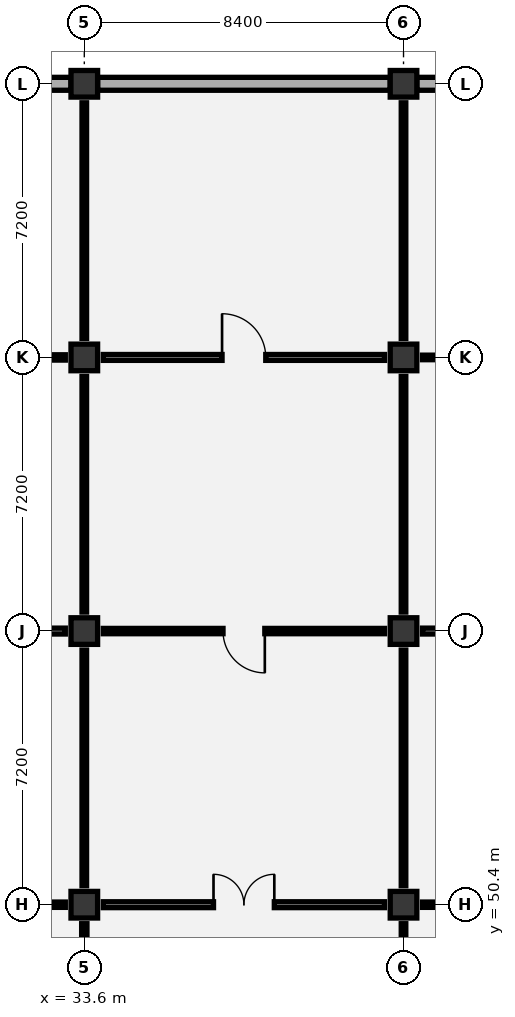
"""IFC4 building model, lengths in metres.
Left out: names, types, materials, properties, quantities, classifications, styles, units other than length and angle.
Written with IfcOpenShell. Run it as: python <this file> out.ifc"""

import sys

from ifc_helpers import new_model, si_unit, direction, frame, frame_2d, origin, origin_2d, place, context, subcontext, project, spatial, rectangle, extrude, element, fill, save


model = new_model("IFC4")
c1 = context("Model", 3, precision=1e-05, world=origin(), true_north=direction((0.0, 1.0)))
c2 = subcontext(c1, "Body", "Model", "MODEL_VIEW")
j1 = project(units=[si_unit("LENGTHUNIT", "METRE"), si_unit("PLANEANGLEUNIT", "RADIAN")], contexts=[c1])
p1 = place(None, origin())
s1 = spatial("IfcSite", under=j1, at=p1, CompositionType="ELEMENT")
p2 = place(p1, origin())
s2 = spatial("IfcBuilding", under=s1, at=p2, CompositionType="ELEMENT")
p3 = place(p2, origin())
s3 = spatial("IfcBuildingStorey", under=s2, at=p3, CompositionType="ELEMENT", Elevation=0.0)
for number, where, z_axis, x_axis in (
    (1, (33.6, 50.4, 0.0), (0.0, 0.0, 1.0), (1.0, 0.0, 0.0)),
    (2, (33.6, 57.6, 0.0), (0.0, 0.0, 1.0), (1.0, 0.0, 0.0)),
    (3, (33.6, 64.8, 0.0), (0.0, 0.0, 1.0), (1.0, 0.0, 0.0)),
    (4, (33.6, 72.0, 0.0), (0.0, 0.0, 1.0), (1.0, 0.0, 0.0)),
    (5, (42.0, 50.4, 0.0), (0.0, 0.0, 1.0), (1.0, 0.0, 0.0)),
    (6, (42.0, 57.6, 0.0), (0.0, 0.0, 1.0), (1.0, 0.0, 0.0)),
    (7, (42.0, 64.8, 0.0), (0.0, 0.0, 1.0), (1.0, 0.0, 0.0)),
    (8, (42.0, 72.0, 0.0), (0.0, 0.0, 1.0), (1.0, 0.0, 0.0)),
):
    element("IfcColumn", number, at=place(p3, frame(where, z_axis=z_axis, x_axis=x_axis)), inside=s3, PredefinedType="COLUMN", context=c2, shape_type="SweptSolid", body=[
        extrude(rectangle(XDim=0.7, YDim=0.7, at=origin_2d()), origin(), (0.0, 0.0, 1.0), 6.0),
    ])
for number, where, z_axis, x_axis in (
    (9, (25.55, 72.0, 0.0), (0.0, 0.0, 1.0), (1.0, 0.0, 0.0)),
    (10, (33.95, 72.0, 0.0), (0.0, 0.0, 1.0), (1.0, 0.0, 0.0)),
    (11, (42.35, 72.0, 0.0), (0.0, 0.0, 1.0), (1.0, 0.0, 0.0)),
):
    element("IfcWall", number, at=place(p3, frame(where, z_axis=z_axis, x_axis=x_axis)), inside=s3, PredefinedType="SOLIDWALL", context=c2, shape_type="SweptSolid", body=[
        extrude(rectangle(XDim=7.7, YDim=0.34, at=frame_2d((3.85, 0.0))), origin(), (0.0, 0.0, 1.0), 5.02),
    ])
p4 = place(p3, frame((33.6, 43.7, 0.0), z_axis=(0.0, 0.0, 1.0), x_axis=(0.0, 1.0, 0.0)))
e12 = element("IfcWall", 12, at=p4, inside=s3, PredefinedType="PARTITIONING", context=c2, shape_type="SweptSolid", body=[
    extrude(rectangle(XDim=6.2, YDim=0.14, at=frame_2d((3.1, 0.0))), origin(), (0.0, 0.0, 1.0), 5.17),
])
p5 = place(p4, frame((2.2, 0.0, 0.0)))
e13 = element("IfcOpeningElement", 13, at=p5, cuts=e12, PredefinedType="OPENING", context=c2, shape_type="SweptSolid", body=[
    extrude(rectangle(XDim=1.8, YDim=2.25, at=frame_2d((0.9, 1.125))), frame((0.0, 0.08, 0.0), z_axis=(0.0, -1.0, 0.0), x_axis=(1.0, 0.0, 0.0)), (0.0, 0.0, 1.0), 0.16),
])
p6 = place(p3, frame((25.7, 50.4, 0.0), z_axis=(0.0, 0.0, 1.0), x_axis=(1.0, 0.0, 0.0)))
e14 = element("IfcWall", 14, at=p6, inside=s3, PredefinedType="PARTITIONING", context=c2, shape_type="SweptSolid", body=[
    extrude(rectangle(XDim=7.4, YDim=0.14, at=frame_2d((3.7, 0.0))), origin(), (0.0, 0.0, 1.0), 4.87),
])
p7 = place(p6, frame((2.9, 0.0, 0.0)))
e15 = element("IfcOpeningElement", 15, at=p7, cuts=e14, PredefinedType="OPENING", context=c2, shape_type="SweptSolid", body=[
    extrude(rectangle(XDim=1.6, YDim=2.2, at=frame_2d((0.8, 1.1))), frame((0.0, 0.08, 0.0), z_axis=(0.0, -1.0, 0.0), x_axis=(1.0, 0.0, 0.0)), (0.0, 0.0, 1.0), 0.16),
])
p8 = place(p3, frame((33.6, 50.9, 0.0), z_axis=(0.0, 0.0, 1.0), x_axis=(0.0, 1.0, 0.0)))
e16 = element("IfcWall", 16, at=p8, inside=s3, PredefinedType="PARTITIONING", context=c2, shape_type="SweptSolid", body=[
    extrude(rectangle(XDim=6.2, YDim=0.12, at=frame_2d((3.1, 0.0))), origin(), (0.0, 0.0, 1.0), 4.92),
])
p9 = place(p3, frame((25.7, 57.6, 0.0), z_axis=(0.0, 0.0, 1.0), x_axis=(1.0, 0.0, 0.0)))
e17 = element("IfcWall", 17, at=p9, inside=s3, PredefinedType="PARTITIONING", context=c2, shape_type="SweptSolid", body=[
    extrude(rectangle(XDim=7.4, YDim=0.155, at=frame_2d((3.7, 0.0))), origin(), (0.0, 0.0, 1.0), 4.87),
])
p10 = place(p9, frame((3.15, 0.0, 0.0)))
e18 = element("IfcOpeningElement", 18, at=p10, cuts=e17, PredefinedType="OPENING", context=c2, shape_type="SweptSolid", body=[
    extrude(rectangle(XDim=1.1, YDim=2.1, at=frame_2d((0.55, 1.05))), frame((0.0, 0.087, 0.0), z_axis=(0.0, -1.0, 0.0), x_axis=(1.0, 0.0, 0.0)), (0.0, 0.0, 1.0), 0.175),
])
p11 = place(p3, frame((33.6, 58.1, 0.0), z_axis=(0.0, 0.0, 1.0), x_axis=(0.0, 1.0, 0.0)))
e19 = element("IfcWall", 19, at=p11, inside=s3, PredefinedType="PARTITIONING", context=c2, shape_type="SweptSolid", body=[
    extrude(rectangle(XDim=6.2, YDim=0.12, at=frame_2d((3.1, 0.0))), origin(), (0.0, 0.0, 1.0), 5.27),
])
p12 = place(p3, frame((25.7, 64.8, 0.0), z_axis=(0.0, 0.0, 1.0), x_axis=(1.0, 0.0, 0.0)))
e20 = element("IfcWall", 20, at=p12, inside=s3, PredefinedType="PARTITIONING", context=c2, shape_type="SweptSolid", body=[
    extrude(rectangle(XDim=7.4, YDim=0.14, at=frame_2d((3.7, 0.0))), origin(), (0.0, 0.0, 1.0), 4.87),
])
p13 = place(p12, frame((3.125, 0.0, 0.0)))
e21 = element("IfcOpeningElement", 21, at=p13, cuts=e20, PredefinedType="OPENING", context=c2, shape_type="SweptSolid", body=[
    extrude(rectangle(XDim=1.15, YDim=2.1, at=frame_2d((0.575, 1.05))), frame((0.0, 0.08, 0.0), z_axis=(0.0, -1.0, 0.0), x_axis=(1.0, 0.0, 0.0)), (0.0, 0.0, 1.0), 0.16),
])
for number, where, z_axis, x_axis in (
    (22, (33.6, 65.3, 0.0), (0.0, 0.0, 1.0), (0.0, 1.0, 0.0)),
    (23, (42.0, 43.7, 0.0), (0.0, 0.0, 1.0), (0.0, 1.0, 0.0)),
):
    element("IfcWall", number, at=place(p3, frame(where, z_axis=z_axis, x_axis=x_axis)), inside=s3, PredefinedType="PARTITIONING", context=c2, shape_type="SweptSolid", body=[
        extrude(rectangle(XDim=6.2, YDim=0.12, at=frame_2d((3.1, 0.0))), origin(), (0.0, 0.0, 1.0), 4.92),
    ])
p14 = place(p3, frame((34.1, 50.4, 0.0), z_axis=(0.0, 0.0, 1.0), x_axis=(1.0, 0.0, 0.0)))
e24 = element("IfcWall", 24, at=p14, inside=s3, PredefinedType="PARTITIONING", context=c2, shape_type="SweptSolid", body=[
    extrude(rectangle(XDim=7.4, YDim=0.155, at=frame_2d((3.7, 0.0))), origin(), (0.0, 0.0, 1.0), 4.87),
])
p15 = place(p14, frame((2.9, 0.0, 0.0)))
e25 = element("IfcOpeningElement", 25, at=p15, cuts=e24, PredefinedType="OPENING", context=c2, shape_type="SweptSolid", body=[
    extrude(rectangle(XDim=1.6, YDim=2.2, at=frame_2d((0.8, 1.1))), frame((0.0, 0.087, 0.0), z_axis=(0.0, -1.0, 0.0), x_axis=(1.0, 0.0, 0.0)), (0.0, 0.0, 1.0), 0.175),
])
p16 = place(p3, frame((42.0, 50.9, 0.0), z_axis=(0.0, 0.0, 1.0), x_axis=(0.0, 1.0, 0.0)))
e26 = element("IfcWall", 26, at=p16, inside=s3, PredefinedType="PARTITIONING", context=c2, shape_type="SweptSolid", body=[
    extrude(rectangle(XDim=6.2, YDim=0.12, at=frame_2d((3.1, 0.0))), origin(), (0.0, 0.0, 1.0), 5.27),
])
p17 = place(p3, frame((34.1, 57.6, 0.0), z_axis=(0.0, 0.0, 1.0), x_axis=(1.0, 0.0, 0.0)))
e27 = element("IfcWall", 27, at=p17, inside=s3, PredefinedType="PARTITIONING", context=c2, shape_type="SweptSolid", body=[
    extrude(rectangle(XDim=7.4, YDim=0.14, at=frame_2d((3.7, 0.0))), origin(), (0.0, 0.0, 1.0), 4.87),
])
p18 = place(p17, frame((3.15, 0.0, 0.0)))
e28 = element("IfcOpeningElement", 28, at=p18, cuts=e27, PredefinedType="OPENING", context=c2, shape_type="SweptSolid", body=[
    extrude(rectangle(XDim=1.1, YDim=2.1, at=frame_2d((0.55, 1.05))), frame((0.0, 0.08, 0.0), z_axis=(0.0, -1.0, 0.0), x_axis=(1.0, 0.0, 0.0)), (0.0, 0.0, 1.0), 0.16),
])
p19 = place(p3, frame((42.0, 58.1, 0.0), z_axis=(0.0, 0.0, 1.0), x_axis=(0.0, 1.0, 0.0)))
e29 = element("IfcWall", 29, at=p19, inside=s3, PredefinedType="PARTITIONING", context=c2, shape_type="SweptSolid", body=[
    extrude(rectangle(XDim=6.2, YDim=0.12, at=frame_2d((3.1, 0.0))), origin(), (0.0, 0.0, 1.0), 4.92),
])
p20 = place(p3, frame((34.1, 64.8, 0.0), z_axis=(0.0, 0.0, 1.0), x_axis=(1.0, 0.0, 0.0)))
e30 = element("IfcWall", 30, at=p20, inside=s3, PredefinedType="PARTITIONING", context=c2, shape_type="SweptSolid", body=[
    extrude(rectangle(XDim=7.4, YDim=0.155, at=frame_2d((3.7, 0.0))), origin(), (0.0, 0.0, 1.0), 4.87),
])
p21 = place(p20, frame((3.125, 0.0, 0.0)))
e31 = element("IfcOpeningElement", 31, at=p21, cuts=e30, PredefinedType="OPENING", context=c2, shape_type="SweptSolid", body=[
    extrude(rectangle(XDim=1.15, YDim=2.1, at=frame_2d((0.575, 1.05))), frame((0.0, 0.087, 0.0), z_axis=(0.0, -1.0, 0.0), x_axis=(1.0, 0.0, 0.0)), (0.0, 0.0, 1.0), 0.175),
])
p22 = place(p3, frame((42.0, 65.3, 0.0), z_axis=(0.0, 0.0, 1.0), x_axis=(0.0, 1.0, 0.0)))
e32 = element("IfcWall", 32, at=p22, inside=s3, PredefinedType="PARTITIONING", context=c2, shape_type="SweptSolid", body=[
    extrude(rectangle(XDim=6.2, YDim=0.12, at=frame_2d((3.1, 0.0))), origin(), (0.0, 0.0, 1.0), 5.38),
])
p23 = place(p3, frame((42.5, 50.4, 0.0), z_axis=(0.0, 0.0, 1.0), x_axis=(1.0, 0.0, 0.0)))
e33 = element("IfcWall", 33, at=p23, inside=s3, PredefinedType="PARTITIONING", context=c2, shape_type="SweptSolid", body=[
    extrude(rectangle(XDim=7.4, YDim=0.14, at=frame_2d((3.7, 0.0))), origin(), (0.0, 0.0, 1.0), 4.87),
])
p24 = place(p23, frame((2.9, 0.0, 0.0)))
e34 = element("IfcOpeningElement", 34, at=p24, cuts=e33, PredefinedType="OPENING", context=c2, shape_type="SweptSolid", body=[
    extrude(rectangle(XDim=1.6, YDim=2.2, at=frame_2d((0.8, 1.1))), frame((0.0, 0.08, 0.0), z_axis=(0.0, -1.0, 0.0), x_axis=(1.0, 0.0, 0.0)), (0.0, 0.0, 1.0), 0.16),
])
p25 = place(p3, frame((42.5, 57.6, 0.0), z_axis=(0.0, 0.0, 1.0), x_axis=(1.0, 0.0, 0.0)))
e35 = element("IfcWall", 35, at=p25, inside=s3, PredefinedType="PARTITIONING", context=c2, shape_type="SweptSolid", body=[
    extrude(rectangle(XDim=7.4, YDim=0.155, at=frame_2d((3.7, 0.0))), origin(), (0.0, 0.0, 1.0), 4.87),
])
p26 = place(p25, frame((3.15, 0.0, 0.0)))
e36 = element("IfcOpeningElement", 36, at=p26, cuts=e35, PredefinedType="OPENING", context=c2, shape_type="SweptSolid", body=[
    extrude(rectangle(XDim=1.1, YDim=2.1, at=frame_2d((0.55, 1.05))), frame((0.0, 0.087, 0.0), z_axis=(0.0, -1.0, 0.0), x_axis=(1.0, 0.0, 0.0)), (0.0, 0.0, 1.0), 0.175),
])
p27 = place(p3, frame((42.5, 64.8, 0.0), z_axis=(0.0, 0.0, 1.0), x_axis=(1.0, 0.0, 0.0)))
e37 = element("IfcWall", 37, at=p27, inside=s3, PredefinedType="PARTITIONING", context=c2, shape_type="SweptSolid", body=[
    extrude(rectangle(XDim=7.4, YDim=0.12, at=frame_2d((3.7, 0.0))), origin(), (0.0, 0.0, 1.0), 4.87),
])
p28 = place(p15, origin())
e38 = element("IfcDoor", 38, at=p28, inside=s3, OperationType="DOUBLE_DOOR_SINGLE_SWING", PredefinedType="DOOR", context=c2, shape_type="SweptSolid", body=[
    extrude(rectangle(XDim=1.6, YDim=2.2, at=frame_2d((0.8, 1.1))), frame((0.0, 0.025, 0.0), z_axis=(0.0, -1.0, 0.0), x_axis=(1.0, 0.0, 0.0)), (0.0, 0.0, 1.0), 0.05),
])
fill(e25, e38)
p29 = place(p18, frame((1.1, 0.0, 0.0), z_axis=(0.0, 0.0, 1.0), x_axis=(-1.0, 0.0, 0.0)))
e39 = element("IfcDoor", 39, at=p29, inside=s3, OperationType="SINGLE_SWING_LEFT", PredefinedType="DOOR", context=c2, shape_type="SweptSolid", body=[
    extrude(rectangle(XDim=1.1, YDim=2.1, at=frame_2d((0.55, 1.05))), frame((0.0, 0.025, 0.0), z_axis=(0.0, -1.0, 0.0), x_axis=(1.0, 0.0, 0.0)), (0.0, 0.0, 1.0), 0.05),
])
fill(e28, e39)
p30 = place(p21, origin())
e40 = element("IfcDoor", 40, at=p30, inside=s3, OperationType="SINGLE_SWING_LEFT", PredefinedType="DOOR", context=c2, shape_type="SweptSolid", body=[
    extrude(rectangle(XDim=1.15, YDim=2.1, at=frame_2d((0.575, 1.05))), frame((0.0, 0.025, 0.0), z_axis=(0.0, -1.0, 0.0), x_axis=(1.0, 0.0, 0.0)), (0.0, 0.0, 1.0), 0.05),
])
fill(e31, e40)
save(model, sys.argv[1])
